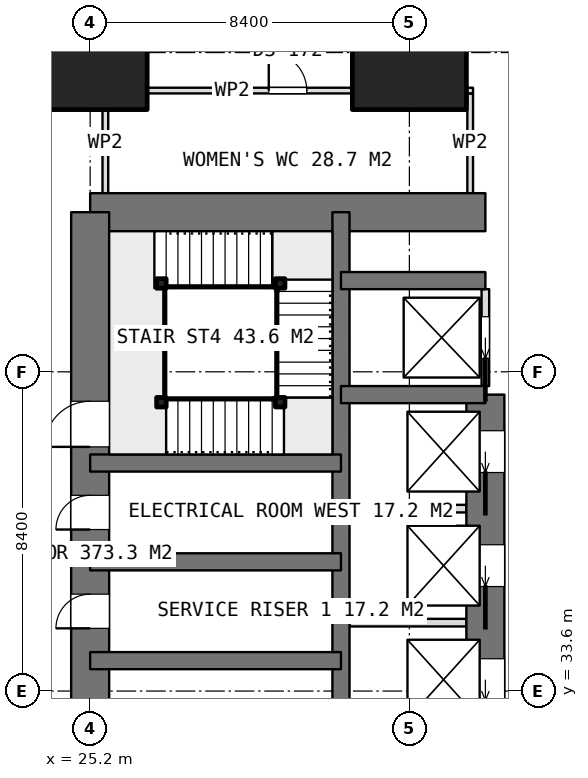
"""IFC4 building model, lengths in metres.
Left out: names, types, materials, properties, quantities, classifications, styles, units other than length and angle.
Written with IfcOpenShell. Run it as: python <this file> out.ifc"""

import sys

from ifc_helpers import new_model, si_unit, direction, frame, frame_2d, origin, origin_2d, place, context, subcontext, project, spatial, rectangle, extrude, element, fill, save


model = new_model("IFC4")
c1 = context("Model", 3, precision=1e-05, world=origin(), true_north=direction((0.0, 1.0)))
c2 = subcontext(c1, "Body", "Model", "MODEL_VIEW")
j1 = project(units=[si_unit("LENGTHUNIT", "METRE"), si_unit("PLANEANGLEUNIT", "RADIAN")], contexts=[c1])
p1 = place(None, origin())
s1 = spatial("IfcSite", under=j1, at=p1, CompositionType="ELEMENT")
p2 = place(p1, origin())
s2 = spatial("IfcBuilding", under=s1, at=p2, CompositionType="ELEMENT")
p3 = place(p2, frame((0.0, 0.0, 159.05)))
s3 = spatial("IfcBuildingStorey", under=s2, at=p3, CompositionType="ELEMENT", Elevation=159.05)
p4 = place(p3, frame((25.2, 46.2, 0.0), z_axis=(0.0, 0.0, 1.0), x_axis=(1.0, 0.0, 0.0)))
e1 = element("IfcWall", 1, at=p4, inside=s3, PredefinedType="SHEAR", context=c2, shape_type="SweptSolid", body=[
    extrude(rectangle(XDim=10.4, YDim=1.0, at=frame_2d((5.2, 0.0))), origin(), (0.0, 0.0, 1.0), 3.75),
])
p5 = place(p3, frame((25.2, 21.0, 0.0), z_axis=(0.0, 0.0, 1.0), x_axis=(0.0, 1.0, 0.0)))
e2 = element("IfcWall", 2, at=p5, inside=s3, PredefinedType="SHEAR", context=c2, shape_type="SweptSolid", body=[
    extrude(rectangle(XDim=25.2, YDim=1.0, at=frame_2d((12.6, 0.0))), origin(), (0.0, 0.0, 1.0), 3.75),
])
p6 = place(p5, frame((7.8, 0.0, 0.0)))
e3 = element("IfcOpeningElement", 3, at=p6, cuts=e2, PredefinedType="OPENING", context=c2, shape_type="SweptSolid", body=[
    extrude(rectangle(XDim=1.2, YDim=2.1, at=frame_2d((0.6, 1.05))), frame((0.0, 0.51, 0.0), z_axis=(0.0, -1.0, 0.0), x_axis=(1.0, 0.0, 0.0)), (0.0, 0.0, 1.0), 1.02),
])
p7 = place(p5, frame((14.25, 0.0, 0.0)))
e4 = element("IfcOpeningElement", 4, at=p7, cuts=e2, PredefinedType="OPENING", context=c2, shape_type="SweptSolid", body=[
    extrude(rectangle(XDim=0.9, YDim=2.1, at=frame_2d((0.45, 1.05))), frame((0.0, 0.51, 0.0), z_axis=(0.0, -1.0, 0.0), x_axis=(1.0, 0.0, 0.0)), (0.0, 0.0, 1.0), 1.02),
])
p8 = place(p5, frame((16.85, 0.0, 0.0)))
e5 = element("IfcOpeningElement", 5, at=p8, cuts=e2, PredefinedType="OPENING", context=c2, shape_type="SweptSolid", body=[
    extrude(rectangle(XDim=0.9, YDim=2.1, at=frame_2d((0.45, 1.05))), frame((0.0, 0.51, 0.0), z_axis=(0.0, -1.0, 0.0), x_axis=(1.0, 0.0, 0.0)), (0.0, 0.0, 1.0), 1.02),
])
p9 = place(p5, frame((19.025, 0.0, 0.0)))
e6 = element("IfcOpeningElement", 6, at=p9, cuts=e2, PredefinedType="OPENING", context=c2, shape_type="SweptSolid", body=[
    extrude(rectangle(XDim=1.2, YDim=2.1, at=frame_2d((0.6, 1.05))), frame((0.0, 0.51, 0.0), z_axis=(0.0, -1.0, 0.0), x_axis=(1.0, 0.0, 0.0)), (0.0, 0.0, 1.0), 1.02),
])
p10 = place(p3, frame((31.8, 21.0, 0.0), z_axis=(0.0, 0.0, 1.0), x_axis=(0.0, 1.0, 0.0)))
e7 = element("IfcWall", 7, at=p10, inside=s3, PredefinedType="SHEAR", context=c2, shape_type="SweptSolid", body=[
    extrude(rectangle(XDim=25.2, YDim=0.45, at=frame_2d((12.6, 0.0))), origin(), (0.0, 0.0, 1.0), 3.75),
])
p11 = place(p3, frame((35.6, 23.4, 0.0), z_axis=(0.0, 0.0, 1.0), x_axis=(0.0, 1.0, 0.0)))
e8 = element("IfcWall", 8, at=p11, inside=s3, PredefinedType="SHEAR", context=c2, shape_type="SweptSolid", body=[
    extrude(rectangle(XDim=18.0, YDim=1.0, at=frame_2d((9.0, 0.0))), origin(), (0.0, 0.0, 1.0), 3.75),
])
p12 = place(p11, frame((0.95, 0.0, 0.0)))
e9 = element("IfcOpeningElement", 9, at=p12, cuts=e8, PredefinedType="OPENING", context=c2, shape_type="SweptSolid", body=[
    extrude(rectangle(XDim=1.1, YDim=2.1, at=frame_2d((0.55, 1.05))), frame((0.0, 0.51, 0.0), z_axis=(0.0, -1.0, 0.0), x_axis=(1.0, 0.0, 0.0)), (0.0, 0.0, 1.0), 1.02),
])
p13 = place(p11, frame((3.95, 0.0, 0.0)))
e10 = element("IfcOpeningElement", 10, at=p13, cuts=e8, PredefinedType="OPENING", context=c2, shape_type="SweptSolid", body=[
    extrude(rectangle(XDim=1.1, YDim=2.1, at=frame_2d((0.55, 1.05))), frame((0.0, 0.51, 0.0), z_axis=(0.0, -1.0, 0.0), x_axis=(1.0, 0.0, 0.0)), (0.0, 0.0, 1.0), 1.02),
])
p14 = place(p11, frame((6.95, 0.0, 0.0)))
e11 = element("IfcOpeningElement", 11, at=p14, cuts=e8, PredefinedType="OPENING", context=c2, shape_type="SweptSolid", body=[
    extrude(rectangle(XDim=1.1, YDim=2.1, at=frame_2d((0.55, 1.05))), frame((0.0, 0.51, 0.0), z_axis=(0.0, -1.0, 0.0), x_axis=(1.0, 0.0, 0.0)), (0.0, 0.0, 1.0), 1.02),
])
p15 = place(p11, frame((9.95, 0.0, 0.0)))
e12 = element("IfcOpeningElement", 12, at=p15, cuts=e8, PredefinedType="OPENING", context=c2, shape_type="SweptSolid", body=[
    extrude(rectangle(XDim=1.1, YDim=2.1, at=frame_2d((0.55, 1.05))), frame((0.0, 0.51, 0.0), z_axis=(0.0, -1.0, 0.0), x_axis=(1.0, 0.0, 0.0)), (0.0, 0.0, 1.0), 1.02),
])
p16 = place(p11, frame((12.95, 0.0, 0.0)))
e13 = element("IfcOpeningElement", 13, at=p16, cuts=e8, PredefinedType="OPENING", context=c2, shape_type="SweptSolid", body=[
    extrude(rectangle(XDim=1.1, YDim=2.1, at=frame_2d((0.55, 1.05))), frame((0.0, 0.51, 0.0), z_axis=(0.0, -1.0, 0.0), x_axis=(1.0, 0.0, 0.0)), (0.0, 0.0, 1.0), 1.02),
])
p17 = place(p11, frame((15.95, 0.0, 0.0)))
e14 = element("IfcOpeningElement", 14, at=p17, cuts=e8, PredefinedType="OPENING", context=c2, shape_type="SweptSolid", body=[
    extrude(rectangle(XDim=1.1, YDim=2.1, at=frame_2d((0.55, 1.05))), frame((0.0, 0.51, 0.0), z_axis=(0.0, -1.0, 0.0), x_axis=(1.0, 0.0, 0.0)), (0.0, 0.0, 1.0), 1.02),
])
for number, where, z_axis, x_axis in (
    (15, (31.8, 41.4, 0.0), (0.0, 0.0, 1.0), (1.0, 0.0, 0.0)),
    (16, (31.8, 44.4, 0.0), (0.0, 0.0, 1.0), (1.0, 0.0, 0.0)),
):
    element("IfcWall", number, at=place(p3, frame(where, z_axis=z_axis, x_axis=x_axis)), inside=s3, PredefinedType="SHEAR", context=c2, shape_type="SweptSolid", body=[
        extrude(rectangle(XDim=3.8, YDim=0.45, at=frame_2d((1.9, 0.0))), origin(), (0.0, 0.0, 1.0), 3.75),
    ])
for number, where, z_axis, x_axis in (
    (17, (25.2, 34.4, 0.0), (0.0, 0.0, 1.0), (1.0, 0.0, 0.0)),
    (18, (25.2, 37.0, 0.0), (0.0, 0.0, 1.0), (1.0, 0.0, 0.0)),
    (19, (25.2, 39.6, 0.0), (0.0, 0.0, 1.0), (1.0, 0.0, 0.0)),
):
    element("IfcWall", number, at=place(p3, frame(where, z_axis=z_axis, x_axis=x_axis)), inside=s3, PredefinedType="SHEAR", context=c2, shape_type="SweptSolid", body=[
        extrude(rectangle(XDim=6.6, YDim=0.45, at=frame_2d((3.3, 0.0))), origin(), (0.0, 0.0, 1.0), 3.75),
    ])
for number, where, z_axis, x_axis in (
    (20, (25.2, 50.4, 0.0), (0.0, 0.0, 1.0), (1.0, 0.0, 0.0)),
    (21, (33.6, 50.4, 0.0), (0.0, 0.0, 1.0), (1.0, 0.0, 0.0)),
):
    element("IfcColumn", number, at=place(p3, frame(where, z_axis=z_axis, x_axis=x_axis)), inside=s3, PredefinedType="COLUMN", context=c2, shape_type="SweptSolid", body=[
        extrude(rectangle(XDim=3.0, YDim=3.0, at=origin_2d()), origin(), (0.0, 0.0, 1.0), 3.75),
    ])
for number, where, z_axis, x_axis in (
    (22, (32.025, 35.4, 0.0), (0.0, 0.0, 1.0), (1.0, 0.0, 0.0)),
    (23, (32.025, 38.4, 0.0), (0.0, 0.0, 1.0), (1.0, 0.0, 0.0)),
):
    element("IfcWall", number, at=place(p3, frame(where, z_axis=z_axis, x_axis=x_axis)), inside=s3, PredefinedType="PARTITIONING", context=c2, shape_type="SweptSolid", body=[
        extrude(rectangle(XDim=3.075, YDim=0.2, at=frame_2d((1.538, 0.0))), origin(), (0.0, 0.0, 1.0), 3.4),
    ])
p18 = place(p3, frame((35.6, 41.625, 0.0), z_axis=(0.0, 0.0, 1.0), x_axis=(0.0, 1.0, 0.0)))
e24 = element("IfcWall", 24, at=p18, inside=s3, PredefinedType="PARTITIONING", context=c2, shape_type="SweptSolid", body=[
    extrude(rectangle(XDim=2.55, YDim=0.2, at=frame_2d((1.275, 0.0))), origin(), (0.0, 0.0, 1.0), 3.4),
])
p19 = place(p18, frame((0.725, 0.0, 0.0)))
e25 = element("IfcOpeningElement", 25, at=p19, cuts=e24, PredefinedType="OPENING", context=c2, shape_type="SweptSolid", body=[
    extrude(rectangle(XDim=1.1, YDim=2.1, at=frame_2d((0.55, 1.05))), frame((0.0, 0.11, 0.0), z_axis=(0.0, -1.0, 0.0), x_axis=(1.0, 0.0, 0.0)), (0.0, 0.0, 1.0), 0.22),
])
p20 = place(p3, frame((25.525, 49.4, 0.0), z_axis=(0.0, 0.0, 1.0), x_axis=(1.0, 0.0, 0.0)))
e26 = element("IfcWall", 26, at=p20, inside=s3, PredefinedType="PARTITIONING", context=c2, shape_type="SweptSolid", body=[
    extrude(rectangle(XDim=9.75, YDim=0.15, at=frame_2d((4.875, 0.0))), origin(), (0.0, 0.0, 1.0), 3.4),
])
p21 = place(p20, frame((4.375, 0.0, 0.0)))
e27 = element("IfcOpeningElement", 27, at=p21, cuts=e26, PredefinedType="OPENING", context=c2, shape_type="SweptSolid", body=[
    extrude(rectangle(XDim=1.0, YDim=2.1, at=frame_2d((0.5, 1.05))), frame((0.0, 0.085, 0.0), z_axis=(0.0, -1.0, 0.0), x_axis=(1.0, 0.0, 0.0)), (0.0, 0.0, 1.0), 0.17),
])
for number, where, z_axis, x_axis in (
    (28, (25.6, 46.7, 0.0), (0.0, 0.0, 1.0), (0.0, 1.0, 0.0)),
    (29, (35.2, 46.7, 0.0), (0.0, 0.0, 1.0), (0.0, 1.0, 0.0)),
):
    element("IfcWall", number, at=place(p3, frame(where, z_axis=z_axis, x_axis=x_axis)), inside=s3, PredefinedType="PARTITIONING", context=c2, shape_type="SweptSolid", body=[
        extrude(rectangle(XDim=2.625, YDim=0.15, at=frame_2d((1.312, 0.0))), origin(), (0.0, 0.0, 1.0), 3.4),
    ])
for number, where, z_axis, x_axis in (
    (30, (27.075, 41.2, 0.0), (0.0, 0.0, 1.0), (1.0, 0.0, 0.0)),
    (31, (30.2, 41.2, 0.0), (0.0, 0.0, 1.0), (1.0, 0.0, 0.0)),
    (32, (30.2, 44.325, 0.0), (0.0, 0.0, 1.0), (1.0, 0.0, 0.0)),
    (33, (27.075, 44.325, 0.0), (0.0, 0.0, 1.0), (1.0, 0.0, 0.0)),
):
    element("IfcColumn", number, at=place(p3, frame(where, z_axis=z_axis, x_axis=x_axis)), inside=s3, PredefinedType="COLUMN", context=c2, shape_type="SweptSolid", body=[
        extrude(rectangle(XDim=0.25, YDim=0.25, at=origin_2d()), origin(), (0.0, 0.0, 1.0), 3.75),
    ])
p22 = place(p7, origin())
e34 = element("IfcDoor", 34, at=p22, inside=s3, OperationType="SINGLE_SWING_LEFT", PredefinedType="DOOR", context=c2, shape_type="SweptSolid", body=[
    extrude(rectangle(XDim=0.9, YDim=2.1, at=frame_2d((0.45, 1.05))), frame((0.0, 0.025, 0.0), z_axis=(0.0, -1.0, 0.0), x_axis=(1.0, 0.0, 0.0)), (0.0, 0.0, 1.0), 0.05),
])
fill(e4, e34)
p23 = place(p8, origin())
e35 = element("IfcDoor", 35, at=p23, inside=s3, OperationType="SINGLE_SWING_LEFT", PredefinedType="DOOR", context=c2, shape_type="SweptSolid", body=[
    extrude(rectangle(XDim=0.9, YDim=2.1, at=frame_2d((0.45, 1.05))), frame((0.0, 0.025, 0.0), z_axis=(0.0, -1.0, 0.0), x_axis=(1.0, 0.0, 0.0)), (0.0, 0.0, 1.0), 0.05),
])
fill(e5, e35)
p24 = place(p15, origin())
e36 = element("IfcDoor", 36, at=p24, inside=s3, OperationType="SLIDING_TO_LEFT", PredefinedType="USERDEFINED", context=c2, shape_type="SweptSolid", body=[
    extrude(rectangle(XDim=1.1, YDim=2.1, at=frame_2d((0.55, 1.05))), frame((0.0, 0.025, 0.0), z_axis=(0.0, -1.0, 0.0), x_axis=(1.0, 0.0, 0.0)), (0.0, 0.0, 1.0), 0.05),
])
fill(e12, e36)
p25 = place(p16, origin())
e37 = element("IfcDoor", 37, at=p25, inside=s3, OperationType="SLIDING_TO_LEFT", PredefinedType="USERDEFINED", context=c2, shape_type="SweptSolid", body=[
    extrude(rectangle(XDim=1.1, YDim=2.1, at=frame_2d((0.55, 1.05))), frame((0.0, 0.025, 0.0), z_axis=(0.0, -1.0, 0.0), x_axis=(1.0, 0.0, 0.0)), (0.0, 0.0, 1.0), 0.05),
])
fill(e13, e37)
p26 = place(p17, origin())
e38 = element("IfcDoor", 38, at=p26, inside=s3, OperationType="SLIDING_TO_LEFT", PredefinedType="USERDEFINED", context=c2, shape_type="SweptSolid", body=[
    extrude(rectangle(XDim=1.1, YDim=2.1, at=frame_2d((0.55, 1.05))), frame((0.0, 0.025, 0.0), z_axis=(0.0, -1.0, 0.0), x_axis=(1.0, 0.0, 0.0)), (0.0, 0.0, 1.0), 0.05),
])
fill(e14, e38)
p27 = place(p19, origin())
e39 = element("IfcDoor", 39, at=p27, inside=s3, OperationType="SLIDING_TO_LEFT", PredefinedType="USERDEFINED", context=c2, shape_type="SweptSolid", body=[
    extrude(rectangle(XDim=1.1, YDim=2.1, at=frame_2d((0.55, 1.05))), frame((0.0, 0.025, 0.0), z_axis=(0.0, -1.0, 0.0), x_axis=(1.0, 0.0, 0.0)), (0.0, 0.0, 1.0), 0.05),
])
fill(e25, e39)
p28 = place(p21, origin())
e40 = element("IfcDoor", 40, at=p28, inside=s3, OperationType="SINGLE_SWING_LEFT", PredefinedType="DOOR", context=c2, shape_type="SweptSolid", body=[
    extrude(rectangle(XDim=1.0, YDim=2.1, at=frame_2d((0.5, 1.05))), frame((0.0, 0.025, 0.0), z_axis=(0.0, -1.0, 0.0), x_axis=(1.0, 0.0, 0.0)), (0.0, 0.0, 1.0), 0.05),
])
fill(e27, e40)
p29 = place(p9, origin())
e41 = element("IfcDoor", 41, at=p29, inside=s3, OperationType="SINGLE_SWING_RIGHT", PredefinedType="DOOR", context=c2, shape_type="SweptSolid", body=[
    extrude(rectangle(XDim=1.2, YDim=2.1, at=frame_2d((0.6, 1.05))), frame((0.0, 0.025, 0.0), z_axis=(0.0, -1.0, 0.0), x_axis=(1.0, 0.0, 0.0)), (0.0, 0.0, 1.0), 0.05),
])
fill(e6, e41)
save(model, sys.argv[1])
